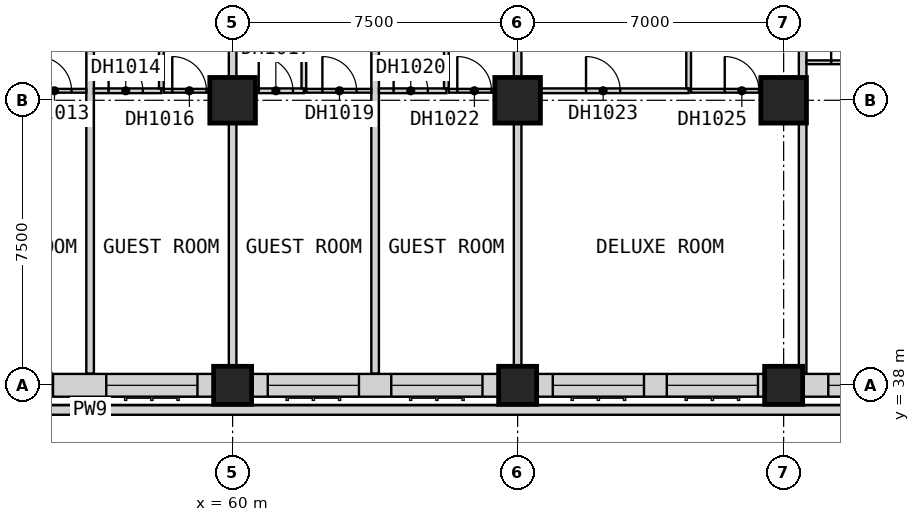
"""IFC4 building model, lengths in metres.
Left out: names, types, materials, properties, quantities, classifications, styles, units other than length and angle.
Written with IfcOpenShell. Run it as: python <this file> out.ifc"""

import sys

from ifc_helpers import new_model, si_unit, direction, frame, frame_2d, origin, origin_2d, place, context, subcontext, project, spatial, rectangle, extrude, element, fill, save


model = new_model("IFC4")
c1 = context("Model", 3, precision=1e-05, world=origin(), true_north=direction((0.0, 1.0)))
c2 = subcontext(c1, "Body", "Model", "MODEL_VIEW")
j1 = project(units=[si_unit("LENGTHUNIT", "METRE"), si_unit("PLANEANGLEUNIT", "RADIAN")], contexts=[c1])
p1 = place(None, origin())
s1 = spatial("IfcSite", under=j1, at=p1, CompositionType="ELEMENT")
p2 = place(p1, origin())
s2 = spatial("IfcBuilding", under=s1, at=p2, CompositionType="ELEMENT")
p3 = place(p2, frame((0.0, 0.0, 34.0)))
s3 = spatial("IfcBuildingStorey", under=s2, at=p3, CompositionType="ELEMENT", Elevation=34.0)
p4 = place(p3, frame((60.0, 38.0, 0.0), z_axis=(0.0, 0.0, 1.0), x_axis=(1.0, 0.0, 0.0)))
e1 = element("IfcColumn", 1, at=p4, inside=s3, PredefinedType="COLUMN", context=c2, shape_type="SweptSolid", body=[
    extrude(rectangle(XDim=1.0, YDim=1.0, at=origin_2d()), origin(), (0.0, 0.0, 1.0), 3.6),
])
p5 = place(p3, frame((60.0, 45.5, 0.0), z_axis=(0.0, 0.0, 1.0), x_axis=(1.0, 0.0, 0.0)))
e2 = element("IfcColumn", 2, at=p5, inside=s3, PredefinedType="COLUMN", context=c2, shape_type="SweptSolid", body=[
    extrude(rectangle(XDim=1.2, YDim=1.2, at=origin_2d()), origin(), (0.0, 0.0, 1.0), 3.6),
])
p6 = place(p3, frame((67.5, 38.0, 0.0), z_axis=(0.0, 0.0, 1.0), x_axis=(1.0, 0.0, 0.0)))
e3 = element("IfcColumn", 3, at=p6, inside=s3, PredefinedType="COLUMN", context=c2, shape_type="SweptSolid", body=[
    extrude(rectangle(XDim=1.0, YDim=1.0, at=origin_2d()), origin(), (0.0, 0.0, 1.0), 3.6),
])
p7 = place(p3, frame((67.5, 45.5, 0.0), z_axis=(0.0, 0.0, 1.0), x_axis=(1.0, 0.0, 0.0)))
e4 = element("IfcColumn", 4, at=p7, inside=s3, PredefinedType="COLUMN", context=c2, shape_type="SweptSolid", body=[
    extrude(rectangle(XDim=1.2, YDim=1.2, at=origin_2d()), origin(), (0.0, 0.0, 1.0), 3.6),
])
p8 = place(p3, frame((74.5, 38.0, 0.0), z_axis=(0.0, 0.0, 1.0), x_axis=(1.0, 0.0, 0.0)))
e5 = element("IfcColumn", 5, at=p8, inside=s3, PredefinedType="COLUMN", context=c2, shape_type="SweptSolid", body=[
    extrude(rectangle(XDim=1.0, YDim=1.0, at=origin_2d()), origin(), (0.0, 0.0, 1.0), 3.6),
])
p9 = place(p3, frame((74.5, 45.5, 0.0), z_axis=(0.0, 0.0, 1.0), x_axis=(1.0, 0.0, 0.0)))
e6 = element("IfcColumn", 6, at=p9, inside=s3, PredefinedType="COLUMN", context=c2, shape_type="SweptSolid", body=[
    extrude(rectangle(XDim=1.2, YDim=1.2, at=origin_2d()), origin(), (0.0, 0.0, 1.0), 3.6),
])
p10 = place(p3, frame((53.0, 38.0, 0.0), z_axis=(0.0, 0.0, 1.0), x_axis=(1.0, 0.0, 0.0)))
e7 = element("IfcWall", 7, at=p10, inside=s3, PredefinedType="SOLIDWALL", context=c2, shape_type="SweptSolid", body=[
    extrude(rectangle(XDim=6.5, YDim=0.6, at=frame_2d((3.25, 0.0))), origin(), (0.0, 0.0, 1.0), 2.85),
])
p11 = place(p10, frame((0.475, 0.0, 0.0)))
e8 = element("IfcOpeningElement", 8, at=p11, cuts=e7, PredefinedType="OPENING", context=c2, shape_type="SweptSolid", body=[
    extrude(rectangle(XDim=1.8, YDim=2.4, at=frame_2d((0.9, 1.2))), frame((0.0, 0.31, 0.0), z_axis=(0.0, -1.0, 0.0), x_axis=(1.0, 0.0, 0.0)), (0.0, 0.0, 1.0), 0.62),
])
p12 = place(p10, frame((3.675, 0.0, 0.8)))
e9 = element("IfcOpeningElement", 9, at=p12, cuts=e7, PredefinedType="OPENING", context=c2, shape_type="SweptSolid", body=[
    extrude(rectangle(XDim=2.4, YDim=1.8, at=frame_2d((1.2, 0.9))), frame((0.0, 0.31, 0.0), z_axis=(0.0, -1.0, 0.0), x_axis=(1.0, 0.0, 0.0)), (0.0, 0.0, 1.0), 0.62),
])
p13 = place(p3, frame((60.5, 38.0, 0.0), z_axis=(0.0, 0.0, 1.0), x_axis=(1.0, 0.0, 0.0)))
e10 = element("IfcWall", 10, at=p13, inside=s3, PredefinedType="SOLIDWALL", context=c2, shape_type="SweptSolid", body=[
    extrude(rectangle(XDim=6.5, YDim=0.6, at=frame_2d((3.25, 0.0))), origin(), (0.0, 0.0, 1.0), 2.85),
])
p14 = place(p13, frame((0.425, 0.0, 0.8)))
e11 = element("IfcOpeningElement", 11, at=p14, cuts=e10, PredefinedType="OPENING", context=c2, shape_type="SweptSolid", body=[
    extrude(rectangle(XDim=2.4, YDim=1.8, at=frame_2d((1.2, 0.9))), frame((0.0, 0.31, 0.0), z_axis=(0.0, -1.0, 0.0), x_axis=(1.0, 0.0, 0.0)), (0.0, 0.0, 1.0), 0.62),
])
p15 = place(p13, frame((3.675, 0.0, 0.8)))
e12 = element("IfcOpeningElement", 12, at=p15, cuts=e10, PredefinedType="OPENING", context=c2, shape_type="SweptSolid", body=[
    extrude(rectangle(XDim=2.4, YDim=1.8, at=frame_2d((1.2, 0.9))), frame((0.0, 0.31, 0.0), z_axis=(0.0, -1.0, 0.0), x_axis=(1.0, 0.0, 0.0)), (0.0, 0.0, 1.0), 0.62),
])
p16 = place(p3, frame((68.0, 38.0, 0.0), z_axis=(0.0, 0.0, 1.0), x_axis=(1.0, 0.0, 0.0)))
e13 = element("IfcWall", 13, at=p16, inside=s3, PredefinedType="SOLIDWALL", context=c2, shape_type="SweptSolid", body=[
    extrude(rectangle(XDim=6.0, YDim=0.6, at=frame_2d((3.0, 0.0))), origin(), (0.0, 0.0, 1.0), 2.85),
])
p17 = place(p16, frame((0.425, 0.0, 0.8)))
e14 = element("IfcOpeningElement", 14, at=p17, cuts=e13, PredefinedType="OPENING", context=c2, shape_type="SweptSolid", body=[
    extrude(rectangle(XDim=2.4, YDim=1.8, at=frame_2d((1.2, 0.9))), frame((0.0, 0.31, 0.0), z_axis=(0.0, -1.0, 0.0), x_axis=(1.0, 0.0, 0.0)), (0.0, 0.0, 1.0), 0.62),
])
p18 = place(p16, frame((3.425, 0.0, 0.8)))
e15 = element("IfcOpeningElement", 15, at=p18, cuts=e13, PredefinedType="OPENING", context=c2, shape_type="SweptSolid", body=[
    extrude(rectangle(XDim=2.4, YDim=1.8, at=frame_2d((1.2, 0.9))), frame((0.0, 0.31, 0.0), z_axis=(0.0, -1.0, 0.0), x_axis=(1.0, 0.0, 0.0)), (0.0, 0.0, 1.0), 0.62),
])
p19 = place(p3, frame((75.0, 38.0, 0.0), z_axis=(0.0, 0.0, 1.0), x_axis=(1.0, 0.0, 0.0)))
e16 = element("IfcWall", 16, at=p19, inside=s3, PredefinedType="SOLIDWALL", context=c2, shape_type="SweptSolid", body=[
    extrude(rectangle(XDim=6.5, YDim=0.6, at=frame_2d((3.25, 0.0))), origin(), (0.0, 0.0, 1.0), 2.85),
])
p20 = place(p19, frame((0.675, 0.0, 0.8)))
e17 = element("IfcOpeningElement", 17, at=p20, cuts=e16, PredefinedType="OPENING", context=c2, shape_type="SweptSolid", body=[
    extrude(rectangle(XDim=2.4, YDim=1.8, at=frame_2d((1.2, 0.9))), frame((0.0, 0.31, 0.0), z_axis=(0.0, -1.0, 0.0), x_axis=(1.0, 0.0, 0.0)), (0.0, 0.0, 1.0), 0.62),
])
p21 = place(p19, frame((3.925, 0.0, 0.8)))
e18 = element("IfcOpeningElement", 18, at=p21, cuts=e16, PredefinedType="OPENING", context=c2, shape_type="SweptSolid", body=[
    extrude(rectangle(XDim=2.4, YDim=1.8, at=frame_2d((1.2, 0.9))), frame((0.0, 0.31, 0.0), z_axis=(0.0, -1.0, 0.0), x_axis=(1.0, 0.0, 0.0)), (0.0, 0.0, 1.0), 0.62),
])
p22 = place(p3, frame((56.25, 38.31, 0.0), z_axis=(0.0, 0.0, 1.0), x_axis=(0.0, 1.0, 0.0)))
e19 = element("IfcWall", 19, at=p22, inside=s3, PredefinedType="PARTITIONING", context=c2, shape_type="SweptSolid", body=[
    extrude(rectangle(XDim=11.715, YDim=0.2, at=frame_2d((5.857, 0.0))), origin(), (0.0, 0.0, 1.0), 3.35),
])
p23 = place(p3, frame((60.0, 37.5, 0.0), z_axis=(0.0, 0.0, 1.0), x_axis=(0.0, 1.0, 0.0)))
e20 = element("IfcWall", 20, at=p23, inside=s3, PredefinedType="PARTITIONING", context=c2, shape_type="SweptSolid", body=[
    extrude(rectangle(XDim=12.525, YDim=0.2, at=frame_2d((6.262, 0.0))), origin(), (0.0, 0.0, 1.0), 3.35),
])
p24 = place(p3, frame((63.75, 38.31, 0.0), z_axis=(0.0, 0.0, 1.0), x_axis=(0.0, 1.0, 0.0)))
e21 = element("IfcWall", 21, at=p24, inside=s3, PredefinedType="PARTITIONING", context=c2, shape_type="SweptSolid", body=[
    extrude(rectangle(XDim=11.715, YDim=0.2, at=frame_2d((5.857, 0.0))), origin(), (0.0, 0.0, 1.0), 3.35),
])
p25 = place(p3, frame((67.5, 37.5, 0.0), z_axis=(0.0, 0.0, 1.0), x_axis=(0.0, 1.0, 0.0)))
e22 = element("IfcWall", 22, at=p25, inside=s3, PredefinedType="PARTITIONING", context=c2, shape_type="SweptSolid", body=[
    extrude(rectangle(XDim=12.525, YDim=0.2, at=frame_2d((6.262, 0.0))), origin(), (0.0, 0.0, 1.0), 3.35),
])
p26 = place(p3, frame((75.0, 38.31, 0.0), z_axis=(0.0, 0.0, 1.0), x_axis=(0.0, 1.0, 0.0)))
e23 = element("IfcWall", 23, at=p26, inside=s3, PredefinedType="PARTITIONING", context=c2, shape_type="SweptSolid", body=[
    extrude(rectangle(XDim=11.715, YDim=0.2, at=frame_2d((5.857, 0.0))), origin(), (0.0, 0.0, 1.0), 3.35),
])
p27 = place(p3, frame((54.438, 45.75, 0.0), z_axis=(0.0, 0.0, 1.0), x_axis=(1.0, 0.0, 0.0)))
e24 = element("IfcWall", 24, at=p27, inside=s3, PredefinedType="PARTITIONING", context=c2, shape_type="SweptSolid", body=[
    extrude(rectangle(XDim=1.712, YDim=0.1, at=frame_2d((0.856, 0.0))), origin(), (0.0, 0.0, 1.0), 3.35),
])
p28 = place(p27, frame((0.425, 0.0, 0.0)))
e25 = element("IfcOpeningElement", 25, at=p28, cuts=e24, PredefinedType="OPENING", context=c2, shape_type="SweptSolid", body=[
    extrude(rectangle(XDim=0.9, YDim=2.1, at=frame_2d((0.45, 1.05))), frame((0.0, 0.06, 0.0), z_axis=(0.0, -1.0, 0.0), x_axis=(1.0, 0.0, 0.0)), (0.0, 0.0, 1.0), 0.12),
])
p29 = place(p3, frame((58.188, 45.75, 0.0), z_axis=(0.0, 0.0, 1.0), x_axis=(1.0, 0.0, 0.0)))
e26 = element("IfcWall", 26, at=p29, inside=s3, PredefinedType="PARTITIONING", context=c2, shape_type="SweptSolid", body=[
    extrude(rectangle(XDim=1.712, YDim=0.1, at=frame_2d((0.856, 0.0))), origin(), (0.0, 0.0, 1.0), 3.35),
])
p30 = place(p29, frame((0.225, 0.0, 0.0)))
e27 = element("IfcOpeningElement", 27, at=p30, cuts=e26, PredefinedType="OPENING", context=c2, shape_type="SweptSolid", body=[
    extrude(rectangle(XDim=0.9, YDim=2.1, at=frame_2d((0.45, 1.05))), frame((0.0, 0.06, 0.0), z_axis=(0.0, -1.0, 0.0), x_axis=(1.0, 0.0, 0.0)), (0.0, 0.0, 1.0), 0.12),
])
p31 = place(p3, frame((61.938, 45.75, 0.0), z_axis=(0.0, 0.0, 1.0), x_axis=(1.0, 0.0, 0.0)))
e28 = element("IfcWall", 28, at=p31, inside=s3, PredefinedType="PARTITIONING", context=c2, shape_type="SweptSolid", body=[
    extrude(rectangle(XDim=1.712, YDim=0.1, at=frame_2d((0.856, 0.0))), origin(), (0.0, 0.0, 1.0), 3.35),
])
p32 = place(p31, frame((0.425, 0.0, 0.0)))
e29 = element("IfcOpeningElement", 29, at=p32, cuts=e28, PredefinedType="OPENING", context=c2, shape_type="SweptSolid", body=[
    extrude(rectangle(XDim=0.9, YDim=2.1, at=frame_2d((0.45, 1.05))), frame((0.0, 0.06, 0.0), z_axis=(0.0, -1.0, 0.0), x_axis=(1.0, 0.0, 0.0)), (0.0, 0.0, 1.0), 0.12),
])
p33 = place(p3, frame((65.688, 45.75, 0.0), z_axis=(0.0, 0.0, 1.0), x_axis=(1.0, 0.0, 0.0)))
e30 = element("IfcWall", 30, at=p33, inside=s3, PredefinedType="PARTITIONING", context=c2, shape_type="SweptSolid", body=[
    extrude(rectangle(XDim=1.712, YDim=0.1, at=frame_2d((0.856, 0.0))), origin(), (0.0, 0.0, 1.0), 3.35),
])
p34 = place(p33, frame((0.225, 0.0, 0.0)))
e31 = element("IfcOpeningElement", 31, at=p34, cuts=e30, PredefinedType="OPENING", context=c2, shape_type="SweptSolid", body=[
    extrude(rectangle(XDim=0.9, YDim=2.1, at=frame_2d((0.45, 1.05))), frame((0.0, 0.06, 0.0), z_axis=(0.0, -1.0, 0.0), x_axis=(1.0, 0.0, 0.0)), (0.0, 0.0, 1.0), 0.12),
])
p35 = place(p3, frame((72.062, 45.75, 0.0), z_axis=(0.0, 0.0, 1.0), x_axis=(1.0, 0.0, 0.0)))
e32 = element("IfcWall", 32, at=p35, inside=s3, PredefinedType="PARTITIONING", context=c2, shape_type="SweptSolid", body=[
    extrude(rectangle(XDim=2.837, YDim=0.1, at=frame_2d((1.419, 0.0))), origin(), (0.0, 0.0, 1.0), 3.35),
])
p36 = place(p35, frame((0.887, 0.0, 0.0)))
e33 = element("IfcOpeningElement", 33, at=p36, cuts=e32, PredefinedType="OPENING", context=c2, shape_type="SweptSolid", body=[
    extrude(rectangle(XDim=0.9, YDim=2.1, at=frame_2d((0.45, 1.05))), frame((0.0, 0.06, 0.0), z_axis=(0.0, -1.0, 0.0), x_axis=(1.0, 0.0, 0.0)), (0.0, 0.0, 1.0), 0.12),
])
p37 = place(p3, frame((75.1, 46.5, 0.0), z_axis=(0.0, 0.0, 1.0), x_axis=(1.0, 0.0, 0.0)))
e34 = element("IfcWall", 34, at=p37, inside=s3, PredefinedType="PARTITIONING", context=c2, shape_type="SweptSolid", body=[
    extrude(rectangle(XDim=7.35, YDim=0.1, at=frame_2d((3.675, 0.0))), origin(), (0.0, 0.0, 1.0), 3.35),
])
p38 = place(p37, frame((0.65, 0.0, 0.0)))
e35 = element("IfcOpeningElement", 35, at=p38, cuts=e34, PredefinedType="OPENING", context=c2, shape_type="SweptSolid", body=[
    extrude(rectangle(XDim=0.9, YDim=2.1, at=frame_2d((0.45, 1.05))), frame((0.0, 0.06, 0.0), z_axis=(0.0, -1.0, 0.0), x_axis=(1.0, 0.0, 0.0)), (0.0, 0.0, 1.0), 0.12),
])
p39 = place(p3, frame((56.35, 45.75, 0.0), z_axis=(0.0, 0.0, 1.0), x_axis=(1.0, 0.0, 0.0)))
e36 = element("IfcWall", 36, at=p39, inside=s3, PredefinedType="PARTITIONING", context=c2, shape_type="SweptSolid", body=[
    extrude(rectangle(XDim=1.775, YDim=0.125, at=frame_2d((0.887, 0.0))), origin(), (0.0, 0.0, 1.0), 3.35),
])
p40 = place(p39, frame((0.387, 0.0, 0.0)))
e37 = element("IfcOpeningElement", 37, at=p40, cuts=e36, PredefinedType="OPENING", context=c2, shape_type="SweptSolid", body=[
    extrude(rectangle(XDim=0.9, YDim=2.1, at=frame_2d((0.45, 1.05))), frame((0.0, 0.073, 0.0), z_axis=(0.0, -1.0, 0.0), x_axis=(1.0, 0.0, 0.0)), (0.0, 0.0, 1.0), 0.145),
])
p41 = place(p3, frame((60.1, 45.75, 0.0), z_axis=(0.0, 0.0, 1.0), x_axis=(1.0, 0.0, 0.0)))
e38 = element("IfcWall", 38, at=p41, inside=s3, PredefinedType="PARTITIONING", context=c2, shape_type="SweptSolid", body=[
    extrude(rectangle(XDim=1.775, YDim=0.125, at=frame_2d((0.887, 0.0))), origin(), (0.0, 0.0, 1.0), 3.35),
])
p42 = place(p41, frame((0.587, 0.0, 0.0)))
e39 = element("IfcOpeningElement", 39, at=p42, cuts=e38, PredefinedType="OPENING", context=c2, shape_type="SweptSolid", body=[
    extrude(rectangle(XDim=0.9, YDim=2.1, at=frame_2d((0.45, 1.05))), frame((0.0, 0.073, 0.0), z_axis=(0.0, -1.0, 0.0), x_axis=(1.0, 0.0, 0.0)), (0.0, 0.0, 1.0), 0.145),
])
p43 = place(p3, frame((63.85, 45.75, 0.0), z_axis=(0.0, 0.0, 1.0), x_axis=(1.0, 0.0, 0.0)))
e40 = element("IfcWall", 40, at=p43, inside=s3, PredefinedType="PARTITIONING", context=c2, shape_type="SweptSolid", body=[
    extrude(rectangle(XDim=1.775, YDim=0.125, at=frame_2d((0.887, 0.0))), origin(), (0.0, 0.0, 1.0), 3.35),
])
p44 = place(p43, frame((0.387, 0.0, 0.0)))
e41 = element("IfcOpeningElement", 41, at=p44, cuts=e40, PredefinedType="OPENING", context=c2, shape_type="SweptSolid", body=[
    extrude(rectangle(XDim=0.9, YDim=2.1, at=frame_2d((0.45, 1.05))), frame((0.0, 0.073, 0.0), z_axis=(0.0, -1.0, 0.0), x_axis=(1.0, 0.0, 0.0)), (0.0, 0.0, 1.0), 0.145),
])
p45 = place(p3, frame((67.6, 45.75, 0.0), z_axis=(0.0, 0.0, 1.0), x_axis=(1.0, 0.0, 0.0)))
e42 = element("IfcWall", 42, at=p45, inside=s3, PredefinedType="PARTITIONING", context=c2, shape_type="SweptSolid", body=[
    extrude(rectangle(XDim=4.4, YDim=0.125, at=frame_2d((2.2, 0.0))), origin(), (0.0, 0.0, 1.0), 3.35),
])
p46 = place(p45, frame((1.7, 0.0, 0.0)))
e43 = element("IfcOpeningElement", 43, at=p46, cuts=e42, PredefinedType="OPENING", context=c2, shape_type="SweptSolid", body=[
    extrude(rectangle(XDim=0.9, YDim=2.1, at=frame_2d((0.45, 1.05))), frame((0.0, 0.073, 0.0), z_axis=(0.0, -1.0, 0.0), x_axis=(1.0, 0.0, 0.0)), (0.0, 0.0, 1.0), 0.145),
])
for number, where, z_axis, x_axis in (
    (44, (58.125, 45.812, 0.0), (0.0, 0.0, 1.0), (0.0, 1.0, 0.0)),
    (45, (61.875, 45.812, 0.0), (0.0, 0.0, 1.0), (0.0, 1.0, 0.0)),
    (46, (65.625, 45.812, 0.0), (0.0, 0.0, 1.0), (0.0, 1.0, 0.0)),
    (47, (72.0, 45.812, 0.0), (0.0, 0.0, 1.0), (0.0, 1.0, 0.0)),
):
    element("IfcWall", number, at=place(p3, frame(where, z_axis=z_axis, x_axis=x_axis)), inside=s3, PredefinedType="PARTITIONING", context=c2, shape_type="SweptSolid", body=[
        extrude(rectangle(XDim=4.212, YDim=0.125, at=frame_2d((2.106, 0.0))), origin(), (0.0, 0.0, 1.0), 3.35),
    ])
p47 = place(p3, frame((23.125, 37.35, 0.0), z_axis=(0.0, 0.0, 1.0), x_axis=(1.0, 0.0, 0.0)))
e48 = element("IfcWall", 48, at=p47, inside=s3, PredefinedType="PARAPET", context=c2, shape_type="SweptSolid", body=[
    extrude(rectangle(XDim=66.25, YDim=0.25, at=frame_2d((33.125, 0.0))), origin(), (0.0, 0.0, 1.0), 1.2),
])
p48 = place(p11, origin())
e49 = element("IfcDoor", 49, at=p48, inside=s3, OperationType="SINGLE_SWING_LEFT", PredefinedType="DOOR", context=c2, shape_type="SweptSolid", body=[
    extrude(rectangle(XDim=1.8, YDim=2.4, at=frame_2d((0.9, 1.2))), frame((0.0, -0.075, 0.0), z_axis=(0.0, -1.0, 0.0), x_axis=(1.0, 0.0, 0.0)), (0.0, 0.0, 1.0), 0.05),
])
fill(e8, e49)
p49 = place(p12, origin())
e50 = element("IfcWindow", 50, at=p49, inside=s3, PartitioningType="SINGLE_PANEL", PredefinedType="WINDOW", context=c2, shape_type="SweptSolid", body=[
    extrude(rectangle(XDim=2.4, YDim=1.8, at=frame_2d((1.2, 0.9))), frame((0.0, -0.07, 0.0), z_axis=(0.0, -1.0, 0.0), x_axis=(1.0, 0.0, 0.0)), (0.0, 0.0, 1.0), 0.06),
])
fill(e9, e50)
p50 = place(p14, origin())
e51 = element("IfcWindow", 51, at=p50, inside=s3, PartitioningType="SINGLE_PANEL", PredefinedType="WINDOW", context=c2, shape_type="SweptSolid", body=[
    extrude(rectangle(XDim=2.4, YDim=1.8, at=frame_2d((1.2, 0.9))), frame((0.0, -0.07, 0.0), z_axis=(0.0, -1.0, 0.0), x_axis=(1.0, 0.0, 0.0)), (0.0, 0.0, 1.0), 0.06),
])
fill(e11, e51)
p51 = place(p15, origin())
e52 = element("IfcWindow", 52, at=p51, inside=s3, PartitioningType="SINGLE_PANEL", PredefinedType="WINDOW", context=c2, shape_type="SweptSolid", body=[
    extrude(rectangle(XDim=2.4, YDim=1.8, at=frame_2d((1.2, 0.9))), frame((0.0, -0.07, 0.0), z_axis=(0.0, -1.0, 0.0), x_axis=(1.0, 0.0, 0.0)), (0.0, 0.0, 1.0), 0.06),
])
fill(e12, e52)
p52 = place(p17, origin())
e53 = element("IfcWindow", 53, at=p52, inside=s3, PartitioningType="SINGLE_PANEL", PredefinedType="WINDOW", context=c2, shape_type="SweptSolid", body=[
    extrude(rectangle(XDim=2.4, YDim=1.8, at=frame_2d((1.2, 0.9))), frame((0.0, -0.07, 0.0), z_axis=(0.0, -1.0, 0.0), x_axis=(1.0, 0.0, 0.0)), (0.0, 0.0, 1.0), 0.06),
])
fill(e14, e53)
p53 = place(p18, origin())
e54 = element("IfcWindow", 54, at=p53, inside=s3, PartitioningType="SINGLE_PANEL", PredefinedType="WINDOW", context=c2, shape_type="SweptSolid", body=[
    extrude(rectangle(XDim=2.4, YDim=1.8, at=frame_2d((1.2, 0.9))), frame((0.0, -0.07, 0.0), z_axis=(0.0, -1.0, 0.0), x_axis=(1.0, 0.0, 0.0)), (0.0, 0.0, 1.0), 0.06),
])
fill(e15, e54)
p54 = place(p20, origin())
e55 = element("IfcWindow", 55, at=p54, inside=s3, PartitioningType="SINGLE_PANEL", PredefinedType="WINDOW", context=c2, shape_type="SweptSolid", body=[
    extrude(rectangle(XDim=2.4, YDim=1.8, at=frame_2d((1.2, 0.9))), frame((0.0, -0.07, 0.0), z_axis=(0.0, -1.0, 0.0), x_axis=(1.0, 0.0, 0.0)), (0.0, 0.0, 1.0), 0.06),
])
fill(e17, e55)
p55 = place(p28, origin())
e56 = element("IfcDoor", 56, at=p55, inside=s3, OperationType="SINGLE_SWING_LEFT", PredefinedType="DOOR", context=c2, shape_type="SweptSolid", body=[
    extrude(rectangle(XDim=0.9, YDim=2.1, at=frame_2d((0.45, 1.05))), frame((0.0, 0.025, 0.0), z_axis=(0.0, -1.0, 0.0), x_axis=(1.0, 0.0, 0.0)), (0.0, 0.0, 1.0), 0.05),
])
fill(e25, e56)
p56 = place(p40, origin())
e57 = element("IfcDoor", 57, at=p56, inside=s3, OperationType="SINGLE_SWING_LEFT", PredefinedType="DOOR", context=c2, shape_type="SweptSolid", body=[
    extrude(rectangle(XDim=0.9, YDim=2.1, at=frame_2d((0.45, 1.05))), frame((0.0, 0.025, 0.0), z_axis=(0.0, -1.0, 0.0), x_axis=(1.0, 0.0, 0.0)), (0.0, 0.0, 1.0), 0.05),
])
fill(e37, e57)
p57 = place(p30, origin())
e58 = element("IfcDoor", 58, at=p57, inside=s3, OperationType="SINGLE_SWING_LEFT", PredefinedType="DOOR", context=c2, shape_type="SweptSolid", body=[
    extrude(rectangle(XDim=0.9, YDim=2.1, at=frame_2d((0.45, 1.05))), frame((0.0, 0.025, 0.0), z_axis=(0.0, -1.0, 0.0), x_axis=(1.0, 0.0, 0.0)), (0.0, 0.0, 1.0), 0.05),
])
fill(e27, e58)
p58 = place(p42, origin())
e59 = element("IfcDoor", 59, at=p58, inside=s3, OperationType="SINGLE_SWING_RIGHT", PredefinedType="DOOR", context=c2, shape_type="SweptSolid", body=[
    extrude(rectangle(XDim=0.9, YDim=2.1, at=frame_2d((0.45, 1.05))), frame((0.0, 0.025, 0.0), z_axis=(0.0, -1.0, 0.0), x_axis=(1.0, 0.0, 0.0)), (0.0, 0.0, 1.0), 0.05),
])
fill(e39, e59)
p59 = place(p32, origin())
e60 = element("IfcDoor", 60, at=p59, inside=s3, OperationType="SINGLE_SWING_LEFT", PredefinedType="DOOR", context=c2, shape_type="SweptSolid", body=[
    extrude(rectangle(XDim=0.9, YDim=2.1, at=frame_2d((0.45, 1.05))), frame((0.0, 0.025, 0.0), z_axis=(0.0, -1.0, 0.0), x_axis=(1.0, 0.0, 0.0)), (0.0, 0.0, 1.0), 0.05),
])
fill(e29, e60)
p60 = place(p44, origin())
e61 = element("IfcDoor", 61, at=p60, inside=s3, OperationType="SINGLE_SWING_LEFT", PredefinedType="DOOR", context=c2, shape_type="SweptSolid", body=[
    extrude(rectangle(XDim=0.9, YDim=2.1, at=frame_2d((0.45, 1.05))), frame((0.0, 0.025, 0.0), z_axis=(0.0, -1.0, 0.0), x_axis=(1.0, 0.0, 0.0)), (0.0, 0.0, 1.0), 0.05),
])
fill(e41, e61)
p61 = place(p34, origin())
e62 = element("IfcDoor", 62, at=p61, inside=s3, OperationType="SINGLE_SWING_LEFT", PredefinedType="DOOR", context=c2, shape_type="SweptSolid", body=[
    extrude(rectangle(XDim=0.9, YDim=2.1, at=frame_2d((0.45, 1.05))), frame((0.0, 0.025, 0.0), z_axis=(0.0, -1.0, 0.0), x_axis=(1.0, 0.0, 0.0)), (0.0, 0.0, 1.0), 0.05),
])
fill(e31, e62)
p62 = place(p46, origin())
e63 = element("IfcDoor", 63, at=p62, inside=s3, OperationType="SINGLE_SWING_LEFT", PredefinedType="DOOR", context=c2, shape_type="SweptSolid", body=[
    extrude(rectangle(XDim=0.9, YDim=2.1, at=frame_2d((0.45, 1.05))), frame((0.0, 0.025, 0.0), z_axis=(0.0, -1.0, 0.0), x_axis=(1.0, 0.0, 0.0)), (0.0, 0.0, 1.0), 0.05),
])
fill(e43, e63)
p63 = place(p36, origin())
e64 = element("IfcDoor", 64, at=p63, inside=s3, OperationType="SINGLE_SWING_LEFT", PredefinedType="DOOR", context=c2, shape_type="SweptSolid", body=[
    extrude(rectangle(XDim=0.9, YDim=2.1, at=frame_2d((0.45, 1.05))), frame((0.0, 0.025, 0.0), z_axis=(0.0, -1.0, 0.0), x_axis=(1.0, 0.0, 0.0)), (0.0, 0.0, 1.0), 0.05),
])
fill(e33, e64)
p64 = place(p38, origin())
e65 = element("IfcDoor", 65, at=p64, inside=s3, OperationType="SINGLE_SWING_RIGHT", PredefinedType="DOOR", context=c2, shape_type="SweptSolid", body=[
    extrude(rectangle(XDim=0.9, YDim=2.1, at=frame_2d((0.45, 1.05))), frame((0.0, 0.025, 0.0), z_axis=(0.0, -1.0, 0.0), x_axis=(1.0, 0.0, 0.0)), (0.0, 0.0, 1.0), 0.05),
])
fill(e35, e65)
save(model, sys.argv[1])
